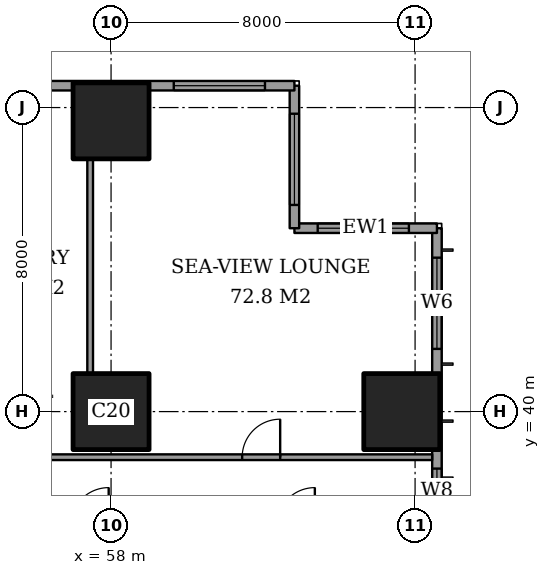
"""IFC4 building model, lengths in metres.
Left out: names, types, materials, properties, quantities, classifications, styles, units other than length and angle.
Written with IfcOpenShell. Run it as: python <this file> out.ifc"""

import sys

from ifc_helpers import new_model, si_unit, direction, frame, frame_2d, origin, origin_2d, place, context, subcontext, project, spatial, rectangle, extrude, element, fill, save


model = new_model("IFC4")
c1 = context("Model", 3, precision=1e-05, world=origin(), true_north=direction((0.0, 1.0)))
c2 = subcontext(c1, "Body", "Model", "MODEL_VIEW")
j1 = project(units=[si_unit("LENGTHUNIT", "METRE"), si_unit("PLANEANGLEUNIT", "RADIAN")], contexts=[c1])
p1 = place(None, origin())
s1 = spatial("IfcSite", under=j1, at=p1, CompositionType="ELEMENT")
p2 = place(p1, origin())
s2 = spatial("IfcBuilding", under=s1, at=p2, CompositionType="ELEMENT")
p3 = place(p2, frame((0.0, 0.0, 54.8)))
s3 = spatial("IfcBuildingStorey", under=s2, at=p3, CompositionType="ELEMENT", Elevation=54.8)
for number, where, z_axis, x_axis in (
    (1, (58.0, 40.0, 0.0), (0.0, 0.0, 1.0), (1.0, 0.0, 0.0)),
    (2, (58.0, 47.65, 0.0), (0.0, 0.0, 1.0), (1.0, 0.0, 0.0)),
    (3, (65.65, 40.0, 0.0), (0.0, 0.0, 1.0), (1.0, 0.0, 0.0)),
):
    element("IfcColumn", number, at=place(p3, frame(where, z_axis=z_axis, x_axis=x_axis)), inside=s3, PredefinedType="COLUMN", context=c2, shape_type="SweptSolid", body=[
        extrude(rectangle(XDim=2.0, YDim=2.0, at=origin_2d()), origin(), (0.0, 0.0, 1.0), 3.6),
    ])
p4 = place(p3, frame((66.575, 3.175, 0.0), z_axis=(0.0, 0.0, 1.0), x_axis=(0.0, 1.0, 0.0)))
e4 = element("IfcWall", 4, at=p4, inside=s3, PredefinedType="SOLIDWALL", context=c2, shape_type="SweptSolid", body=[
    extrude(rectangle(XDim=41.65, YDim=0.25, at=frame_2d((20.825, 0.0))), origin(), (0.0, 0.0, 1.0), 3.6),
])
p5 = place(p4, frame((0.775, 0.0, 0.6)))
e5 = element("IfcOpeningElement", 5, at=p5, cuts=e4, PredefinedType="OPENING", context=c2, shape_type="SweptSolid", body=[
    extrude(rectangle(XDim=2.4, YDim=2.0, at=frame_2d((1.2, 1.0))), frame((0.0, 0.135, 0.0), z_axis=(0.0, -1.0, 0.0), x_axis=(1.0, 0.0, 0.0)), (0.0, 0.0, 1.0), 0.27),
])
p6 = place(p4, frame((6.125, 0.0, 0.6)))
e6 = element("IfcOpeningElement", 6, at=p6, cuts=e4, PredefinedType="OPENING", context=c2, shape_type="SweptSolid", body=[
    extrude(rectangle(XDim=1.2, YDim=2.0, at=frame_2d((0.6, 1.0))), frame((0.0, 0.135, 0.0), z_axis=(0.0, -1.0, 0.0), x_axis=(1.0, 0.0, 0.0)), (0.0, 0.0, 1.0), 0.27),
])
p7 = place(p4, frame((8.375, 0.0, 0.6)))
e7 = element("IfcOpeningElement", 7, at=p7, cuts=e4, PredefinedType="OPENING", context=c2, shape_type="SweptSolid", body=[
    extrude(rectangle(XDim=2.4, YDim=2.0, at=frame_2d((1.2, 1.0))), frame((0.0, 0.135, 0.0), z_axis=(0.0, -1.0, 0.0), x_axis=(1.0, 0.0, 0.0)), (0.0, 0.0, 1.0), 0.27),
])
p8 = place(p4, frame((15.775, 0.0, 0.6)))
e8 = element("IfcOpeningElement", 8, at=p8, cuts=e4, PredefinedType="OPENING", context=c2, shape_type="SweptSolid", body=[
    extrude(rectangle(XDim=2.4, YDim=2.0, at=frame_2d((1.2, 1.0))), frame((0.0, 0.135, 0.0), z_axis=(0.0, -1.0, 0.0), x_axis=(1.0, 0.0, 0.0)), (0.0, 0.0, 1.0), 0.27),
])
p9 = place(p4, frame((23.475, 0.0, 0.6)))
e9 = element("IfcOpeningElement", 9, at=p9, cuts=e4, PredefinedType="OPENING", context=c2, shape_type="SweptSolid", body=[
    extrude(rectangle(XDim=2.4, YDim=2.0, at=frame_2d((1.2, 1.0))), frame((0.0, 0.135, 0.0), z_axis=(0.0, -1.0, 0.0), x_axis=(1.0, 0.0, 0.0)), (0.0, 0.0, 1.0), 0.27),
])
p10 = place(p4, frame((30.775, 0.0, 0.6)))
e10 = element("IfcOpeningElement", 10, at=p10, cuts=e4, PredefinedType="OPENING", context=c2, shape_type="SweptSolid", body=[
    extrude(rectangle(XDim=2.4, YDim=2.0, at=frame_2d((1.2, 1.0))), frame((0.0, 0.135, 0.0), z_axis=(0.0, -1.0, 0.0), x_axis=(1.0, 0.0, 0.0)), (0.0, 0.0, 1.0), 0.27),
])
p11 = place(p4, frame((34.125, 0.0, 0.6)))
e11 = element("IfcOpeningElement", 11, at=p11, cuts=e4, PredefinedType="OPENING", context=c2, shape_type="SweptSolid", body=[
    extrude(rectangle(XDim=1.2, YDim=2.0, at=frame_2d((0.6, 1.0))), frame((0.0, 0.135, 0.0), z_axis=(0.0, -1.0, 0.0), x_axis=(1.0, 0.0, 0.0)), (0.0, 0.0, 1.0), 0.27),
])
p12 = place(p4, frame((38.475, 0.0, 0.6)))
e12 = element("IfcOpeningElement", 12, at=p12, cuts=e4, PredefinedType="OPENING", context=c2, shape_type="SweptSolid", body=[
    extrude(rectangle(XDim=2.4, YDim=2.0, at=frame_2d((1.2, 1.0))), frame((0.0, 0.135, 0.0), z_axis=(0.0, -1.0, 0.0), x_axis=(1.0, 0.0, 0.0)), (0.0, 0.0, 1.0), 0.27),
])
p13 = place(p3, frame((66.575, 44.825, 0.0), z_axis=(0.0, 0.0, 1.0), x_axis=(-1.0, 0.0, 0.0)))
e13 = element("IfcWall", 13, at=p13, inside=s3, PredefinedType="SOLIDWALL", context=c2, shape_type="SweptSolid", body=[
    extrude(rectangle(XDim=3.75, YDim=0.25, at=frame_2d((1.875, 0.0))), origin(), (0.0, 0.0, 1.0), 3.6),
])
p14 = place(p13, frame((0.738, 0.0, 0.6)))
e14 = element("IfcOpeningElement", 14, at=p14, cuts=e13, PredefinedType="OPENING", context=c2, shape_type="SweptSolid", body=[
    extrude(rectangle(XDim=2.4, YDim=2.0, at=frame_2d((1.2, 1.0))), frame((0.0, 0.135, 0.0), z_axis=(0.0, -1.0, 0.0), x_axis=(1.0, 0.0, 0.0)), (0.0, 0.0, 1.0), 0.27),
])
p15 = place(p3, frame((62.825, 44.825, 0.0), z_axis=(0.0, 0.0, 1.0), x_axis=(0.0, 1.0, 0.0)))
e15 = element("IfcWall", 15, at=p15, inside=s3, PredefinedType="SOLIDWALL", context=c2, shape_type="SweptSolid", body=[
    extrude(rectangle(XDim=3.75, YDim=0.25, at=frame_2d((1.875, 0.0))), origin(), (0.0, 0.0, 1.0), 3.6),
])
p16 = place(p15, frame((0.613, 0.0, 0.6)))
e16 = element("IfcOpeningElement", 16, at=p16, cuts=e15, PredefinedType="OPENING", context=c2, shape_type="SweptSolid", body=[
    extrude(rectangle(XDim=2.4, YDim=2.0, at=frame_2d((1.2, 1.0))), frame((0.0, 0.135, 0.0), z_axis=(0.0, -1.0, 0.0), x_axis=(1.0, 0.0, 0.0)), (0.0, 0.0, 1.0), 0.27),
])
p17 = place(p3, frame((62.825, 48.575, 0.0), z_axis=(0.0, 0.0, 1.0), x_axis=(-1.0, 0.0, 0.0)))
e17 = element("IfcWall", 17, at=p17, inside=s3, PredefinedType="SOLIDWALL", context=c2, shape_type="SweptSolid", body=[
    extrude(rectangle(XDim=21.4, YDim=0.25, at=frame_2d((10.7, 0.0))), origin(), (0.0, 0.0, 1.0), 3.6),
])
p18 = place(p17, frame((0.775, 0.0, 0.6)))
e18 = element("IfcOpeningElement", 18, at=p18, cuts=e17, PredefinedType="OPENING", context=c2, shape_type="SweptSolid", body=[
    extrude(rectangle(XDim=2.4, YDim=2.0, at=frame_2d((1.2, 1.0))), frame((0.0, 0.135, 0.0), z_axis=(0.0, -1.0, 0.0), x_axis=(1.0, 0.0, 0.0)), (0.0, 0.0, 1.0), 0.27),
])
p19 = place(p17, frame((6.725, 0.0, 0.6)))
e19 = element("IfcOpeningElement", 19, at=p19, cuts=e17, PredefinedType="OPENING", context=c2, shape_type="SweptSolid", body=[
    extrude(rectangle(XDim=1.2, YDim=2.0, at=frame_2d((0.6, 1.0))), frame((0.0, 0.135, 0.0), z_axis=(0.0, -1.0, 0.0), x_axis=(1.0, 0.0, 0.0)), (0.0, 0.0, 1.0), 0.27),
])
p20 = place(p17, frame((9.725, 0.0, 0.6)))
e20 = element("IfcOpeningElement", 20, at=p20, cuts=e17, PredefinedType="OPENING", context=c2, shape_type="SweptSolid", body=[
    extrude(rectangle(XDim=1.2, YDim=2.0, at=frame_2d((0.6, 1.0))), frame((0.0, 0.135, 0.0), z_axis=(0.0, -1.0, 0.0), x_axis=(1.0, 0.0, 0.0)), (0.0, 0.0, 1.0), 0.27),
])
p21 = place(p17, frame((14.775, 0.0, 0.6)))
e21 = element("IfcOpeningElement", 21, at=p21, cuts=e17, PredefinedType="OPENING", context=c2, shape_type="SweptSolid", body=[
    extrude(rectangle(XDim=1.2, YDim=2.0, at=frame_2d((0.6, 1.0))), frame((0.0, 0.135, 0.0), z_axis=(0.0, -1.0, 0.0), x_axis=(1.0, 0.0, 0.0)), (0.0, 0.0, 1.0), 0.27),
])
p22 = place(p17, frame((17.6, 0.0, 0.6)))
e22 = element("IfcOpeningElement", 22, at=p22, cuts=e17, PredefinedType="OPENING", context=c2, shape_type="SweptSolid", body=[
    extrude(rectangle(XDim=1.2, YDim=2.0, at=frame_2d((0.6, 1.0))), frame((0.0, 0.135, 0.0), z_axis=(0.0, -1.0, 0.0), x_axis=(1.0, 0.0, 0.0)), (0.0, 0.0, 1.0), 0.27),
])
p23 = place(p3, frame((51.2, 38.8, 0.0), z_axis=(0.0, 0.0, 1.0), x_axis=(1.0, 0.0, 0.0)))
e23 = element("IfcWall", 23, at=p23, inside=s3, PredefinedType="PARTITIONING", context=c2, shape_type="SweptSolid", body=[
    extrude(rectangle(XDim=15.25, YDim=0.15, at=frame_2d((7.625, 0.0))), origin(), (0.0, 0.0, 1.0), 3.35),
])
p24 = place(p23, frame((10.25, 0.0, 0.0)))
e24 = element("IfcOpeningElement", 24, at=p24, cuts=e23, PredefinedType="OPENING", context=c2, shape_type="SweptSolid", body=[
    extrude(rectangle(XDim=1.0, YDim=2.1, at=frame_2d((0.5, 1.05))), frame((0.0, 0.085, 0.0), z_axis=(0.0, -1.0, 0.0), x_axis=(1.0, 0.0, 0.0)), (0.0, 0.0, 1.0), 0.17),
])
p25 = place(p23, frame((4.025, 0.0, 0.0)))
e25 = element("IfcOpeningElement", 25, at=p25, cuts=e23, PredefinedType="OPENING", context=c2, shape_type="SweptSolid", body=[
    extrude(rectangle(XDim=1.0, YDim=2.1, at=frame_2d((0.5, 1.05))), frame((0.0, 0.085, 0.0), z_axis=(0.0, -1.0, 0.0), x_axis=(1.0, 0.0, 0.0)), (0.0, 0.0, 1.0), 0.17),
])
p26 = place(p23, frame((0.9, 0.0, 0.0)))
e26 = element("IfcOpeningElement", 26, at=p26, cuts=e23, PredefinedType="OPENING", context=c2, shape_type="SweptSolid", body=[
    extrude(rectangle(XDim=1.0, YDim=2.1, at=frame_2d((0.5, 1.05))), frame((0.0, 0.085, 0.0), z_axis=(0.0, -1.0, 0.0), x_axis=(1.0, 0.0, 0.0)), (0.0, 0.0, 1.0), 0.17),
])
p27 = place(p3, frame((57.45, 41.0, 0.0), z_axis=(0.0, 0.0, 1.0), x_axis=(0.0, 1.0, 0.0)))
e27 = element("IfcWall", 27, at=p27, inside=s3, PredefinedType="PARTITIONING", context=c2, shape_type="SweptSolid", body=[
    extrude(rectangle(XDim=5.65, YDim=0.15, at=frame_2d((2.825, 0.0))), origin(), (0.0, 0.0, 1.0), 3.35),
])
p28 = place(p11, origin())
e28 = element("IfcWindow", 28, at=p28, inside=s3, PartitioningType="SINGLE_PANEL", PredefinedType="WINDOW", context=c2, shape_type="SweptSolid", body=[
    extrude(rectangle(XDim=1.2, YDim=2.0, at=frame_2d((0.6, 1.0))), frame((0.0, 0.03, 0.0), z_axis=(0.0, -1.0, 0.0), x_axis=(1.0, 0.0, 0.0)), (0.0, 0.0, 1.0), 0.06),
])
fill(e11, e28)
p29 = place(p12, origin())
e29 = element("IfcWindow", 29, at=p29, inside=s3, PartitioningType="SINGLE_PANEL", PredefinedType="WINDOW", context=c2, shape_type="SweptSolid", body=[
    extrude(rectangle(XDim=2.4, YDim=2.0, at=frame_2d((1.2, 1.0))), frame((0.0, 0.03, 0.0), z_axis=(0.0, -1.0, 0.0), x_axis=(1.0, 0.0, 0.0)), (0.0, 0.0, 1.0), 0.06),
])
fill(e12, e29)
p30 = place(p14, origin())
e30 = element("IfcWindow", 30, at=p30, inside=s3, PartitioningType="SINGLE_PANEL", PredefinedType="WINDOW", context=c2, shape_type="SweptSolid", body=[
    extrude(rectangle(XDim=2.4, YDim=2.0, at=frame_2d((1.2, 1.0))), frame((0.0, 0.03, 0.0), z_axis=(0.0, -1.0, 0.0), x_axis=(1.0, 0.0, 0.0)), (0.0, 0.0, 1.0), 0.06),
])
fill(e14, e30)
p31 = place(p16, origin())
e31 = element("IfcWindow", 31, at=p31, inside=s3, PartitioningType="SINGLE_PANEL", PredefinedType="WINDOW", context=c2, shape_type="SweptSolid", body=[
    extrude(rectangle(XDim=2.4, YDim=2.0, at=frame_2d((1.2, 1.0))), frame((0.0, 0.03, 0.0), z_axis=(0.0, -1.0, 0.0), x_axis=(1.0, 0.0, 0.0)), (0.0, 0.0, 1.0), 0.06),
])
fill(e16, e31)
p32 = place(p18, origin())
e32 = element("IfcWindow", 32, at=p32, inside=s3, PartitioningType="SINGLE_PANEL", PredefinedType="WINDOW", context=c2, shape_type="SweptSolid", body=[
    extrude(rectangle(XDim=2.4, YDim=2.0, at=frame_2d((1.2, 1.0))), frame((0.0, 0.03, 0.0), z_axis=(0.0, -1.0, 0.0), x_axis=(1.0, 0.0, 0.0)), (0.0, 0.0, 1.0), 0.06),
])
fill(e18, e32)
p33 = place(p24, origin())
e33 = element("IfcDoor", 33, at=p33, inside=s3, OperationType="SINGLE_SWING_LEFT", PredefinedType="DOOR", context=c2, shape_type="SweptSolid", body=[
    extrude(rectangle(XDim=1.0, YDim=2.1, at=frame_2d((0.5, 1.05))), frame((0.0, 0.025, 0.0), z_axis=(0.0, -1.0, 0.0), x_axis=(1.0, 0.0, 0.0)), (0.0, 0.0, 1.0), 0.05),
])
fill(e24, e33)
save(model, sys.argv[1])
